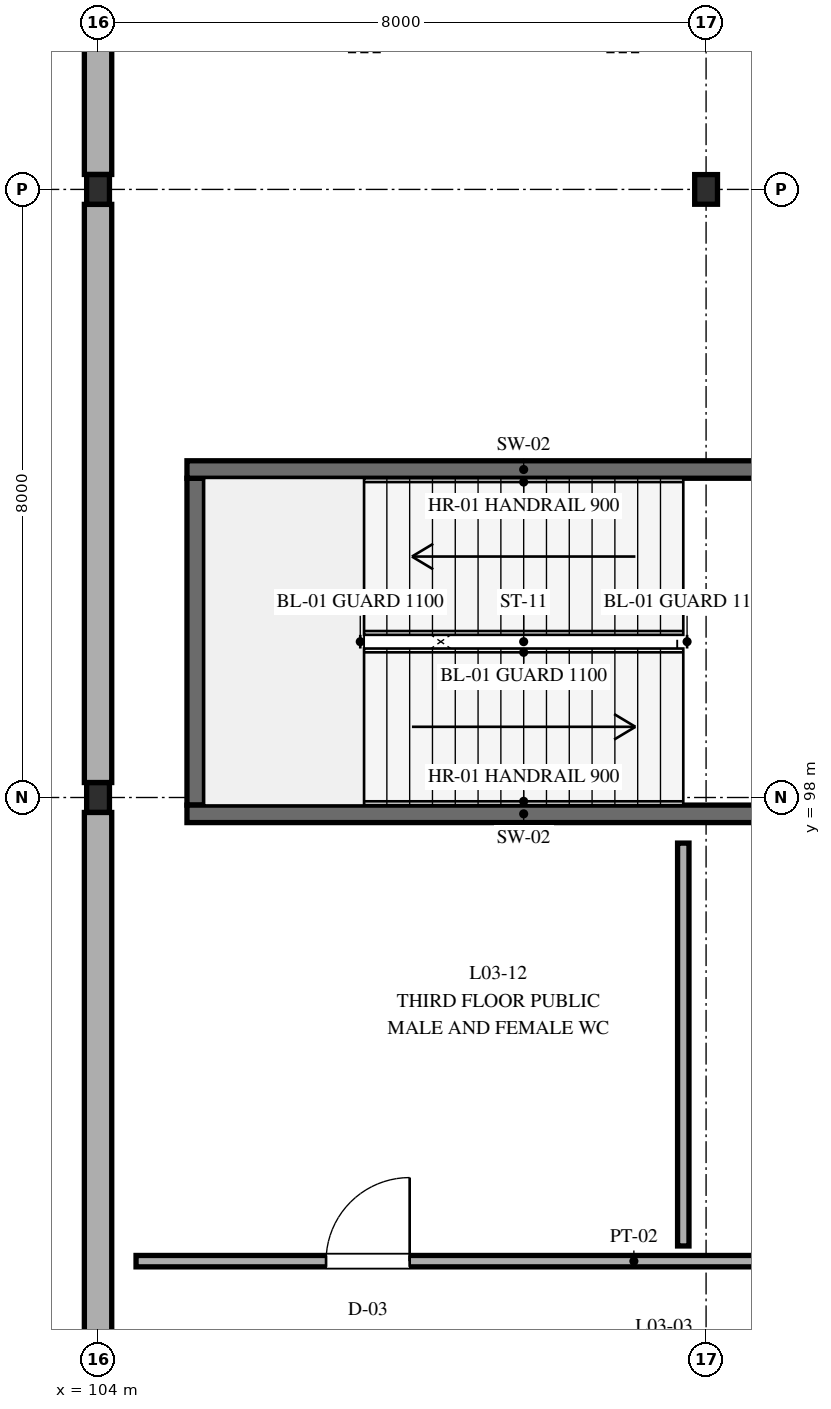
"""IFC4 building model, lengths in metres.
Left out: names, types, materials, properties, quantities, classifications, styles, units other than length and angle.
Written with IfcOpenShell. Run it as: python <this file> out.ifc"""

import sys

from ifc_helpers import new_model, si_unit, direction, frame, frame_2d, origin, origin_2d, place, context, subcontext, project, spatial, rectangle, i_section, extrude, element, fill, save


model = new_model("IFC4")
c1 = context("Model", 3, precision=1e-05, world=origin(), true_north=direction((0.0, 1.0)))
c2 = subcontext(c1, "Body", "Model", "MODEL_VIEW")
j1 = project(units=[si_unit("LENGTHUNIT", "METRE"), si_unit("PLANEANGLEUNIT", "RADIAN")], contexts=[c1])
p1 = place(None, origin())
s1 = spatial("IfcSite", under=j1, at=p1, CompositionType="ELEMENT")
p2 = place(p1, origin())
s2 = spatial("IfcBuilding", under=s1, at=p2, CompositionType="ELEMENT")
p3 = place(p2, frame((0.0, 0.0, 14.0)))
s3 = spatial("IfcBuildingStorey", under=s2, at=p3, CompositionType="ELEMENT", Elevation=14.0)
for number, where, z_axis, x_axis in (
    (1, (104.0, 98.0, 0.0), (0.0, 0.0, 1.0), (1.0, 0.0, 0.0)),
    (2, (104.0, 106.0, 0.0), (0.0, 0.0, 1.0), (1.0, 0.0, 0.0)),
    (3, (112.0, 106.0, 0.0), (0.0, 0.0, 1.0), (1.0, 0.0, 0.0)),
):
    element("IfcColumn", number, at=place(p3, frame(where, z_axis=z_axis, x_axis=x_axis)), inside=s3, PredefinedType="COLUMN", context=c2, shape_type="SweptSolid", body=[
        extrude(i_section(OverallWidth=0.3, OverallDepth=0.39, WebThickness=0.011, FlangeThickness=0.019, FilletRadius=0.027, at=origin_2d()), origin(), (0.0, 0.0, 1.0), 4.6),
    ])
for number, where, z_axis, x_axis in (
    (4, (104.0, 97.803, 0.0), (0.0, 0.0, 1.0), (0.0, -1.0, 0.0)),
    (5, (104.0, 105.803, 0.0), (0.0, 0.0, 1.0), (0.0, -1.0, 0.0)),
):
    element("IfcWall", number, at=place(p3, frame(where, z_axis=z_axis, x_axis=x_axis)), inside=s3, PredefinedType="STANDARD", context=c2, shape_type="SweptSolid", body=[
        extrude(rectangle(XDim=7.606, YDim=0.36, at=frame_2d((3.803, 0.0))), origin(), (0.0, 0.0, 1.0), 4.005),
    ])
p4 = place(p3, frame((104.0, 116.803, 0.0), z_axis=(0.0, 0.0, 1.0), x_axis=(0.0, -1.0, 0.0)))
e6 = element("IfcWall", 6, at=p4, inside=s3, PredefinedType="STANDARD", context=c2, shape_type="SweptSolid", body=[
    extrude(rectangle(XDim=10.606, YDim=0.36, at=frame_2d((5.303, 0.0))), origin(), (0.0, 0.0, 1.0), 4.005),
])
p5 = place(p3, frame((105.285, 102.2, 0.0), z_axis=(0.0, 0.0, 1.0), x_axis=(0.0, -1.0, 0.0)))
e7 = element("IfcWall", 7, at=p5, inside=s3, PredefinedType="SHEAR", context=c2, shape_type="SweptSolid", body=[
    extrude(rectangle(XDim=4.3, YDim=0.23, at=frame_2d((2.15, 0.0))), origin(), (0.0, 0.0, 1.0), 4.6),
])
for number, where, z_axis, x_axis in (
    (8, (105.17, 97.785, 0.0), (0.0, 0.0, 1.0), (1.0, 0.0, 0.0)),
    (9, (114.03, 102.315, 0.0), (0.0, 0.0, 1.0), (-1.0, 0.0, 0.0)),
):
    element("IfcWall", number, at=place(p3, frame(where, z_axis=z_axis, x_axis=x_axis)), inside=s3, PredefinedType="SHEAR", context=c2, shape_type="SweptSolid", body=[
        extrude(rectangle(XDim=8.86, YDim=0.23, at=frame_2d((4.43, 0.0))), origin(), (0.0, 0.0, 1.0), 4.6),
    ])
p6 = place(p3, frame((104.5, 91.9, 0.0), z_axis=(0.0, 0.0, 1.0), x_axis=(1.0, 0.0, 0.0)))
e10 = element("IfcWall", 10, at=p6, inside=s3, PredefinedType="PARTITIONING", context=c2, shape_type="SweptSolid", body=[
    extrude(rectangle(XDim=47.0, YDim=0.15, at=frame_2d((23.5, 0.0))), origin(), (0.0, 0.0, 1.0), 3.85),
])
p7 = place(p6, frame((2.5, 0.0, 0.0)))
e11 = element("IfcOpeningElement", 11, at=p7, cuts=e10, PredefinedType="OPENING", context=c2, shape_type="SweptSolid", body=[
    extrude(rectangle(XDim=1.1, YDim=2.2, at=frame_2d((0.55, 1.1))), frame((0.0, 0.085, 0.0), z_axis=(0.0, -1.0, 0.0), x_axis=(1.0, 0.0, 0.0)), (0.0, 0.0, 1.0), 0.17),
])
p8 = place(p6, frame((9.5, 0.0, 0.0)))
e12 = element("IfcOpeningElement", 12, at=p8, cuts=e10, PredefinedType="OPENING", context=c2, shape_type="SweptSolid", body=[
    extrude(rectangle(XDim=1.05, YDim=2.15, at=frame_2d((0.525, 1.075))), frame((0.0, 0.085, 0.0), z_axis=(0.0, -1.0, 0.0), x_axis=(1.0, 0.0, 0.0)), (0.0, 0.0, 1.0), 0.17),
])
p9 = place(p6, frame((12.5, 0.0, 0.0)))
e13 = element("IfcOpeningElement", 13, at=p9, cuts=e10, PredefinedType="OPENING", context=c2, shape_type="SweptSolid", body=[
    extrude(rectangle(XDim=1.6, YDim=2.2, at=frame_2d((0.8, 1.1))), frame((0.0, 0.085, 0.0), z_axis=(0.0, -1.0, 0.0), x_axis=(1.0, 0.0, 0.0)), (0.0, 0.0, 1.0), 0.17),
])
p10 = place(p6, frame((22.0, 0.0, 0.0)))
e14 = element("IfcOpeningElement", 14, at=p10, cuts=e10, PredefinedType="OPENING", context=c2, shape_type="SweptSolid", body=[
    extrude(rectangle(XDim=1.6, YDim=2.2, at=frame_2d((0.8, 1.1))), frame((0.0, 0.085, 0.0), z_axis=(0.0, -1.0, 0.0), x_axis=(1.0, 0.0, 0.0)), (0.0, 0.0, 1.0), 0.17),
])
p11 = place(p6, frame((38.0, 0.0, 0.0)))
e15 = element("IfcOpeningElement", 15, at=p11, cuts=e10, PredefinedType="OPENING", context=c2, shape_type="SweptSolid", body=[
    extrude(rectangle(XDim=1.6, YDim=2.2, at=frame_2d((0.8, 1.1))), frame((0.0, 0.085, 0.0), z_axis=(0.0, -1.0, 0.0), x_axis=(1.0, 0.0, 0.0)), (0.0, 0.0, 1.0), 0.17),
])
p12 = place(p3, frame((111.7, 92.1, 0.0), z_axis=(0.0, 0.0, 1.0), x_axis=(0.0, 1.0, 0.0)))
e16 = element("IfcWall", 16, at=p12, inside=s3, PredefinedType="PARTITIONING", context=c2, shape_type="SweptSolid", body=[
    extrude(rectangle(XDim=5.3, YDim=0.15, at=frame_2d((2.65, 0.0))), origin(), (0.0, 0.0, 1.0), 3.85),
])
p13 = place(p7, origin())
e17 = element("IfcDoor", 17, at=p13, inside=s3, OperationType="SINGLE_SWING_RIGHT", PredefinedType="DOOR", context=c2, shape_type="SweptSolid", body=[
    extrude(rectangle(XDim=1.1, YDim=2.2, at=frame_2d((0.55, 1.1))), frame((0.0, 0.025, 0.0), z_axis=(0.0, -1.0, 0.0), x_axis=(1.0, 0.0, 0.0)), (0.0, 0.0, 1.0), 0.05),
])
fill(e11, e17)
save(model, sys.argv[1])
